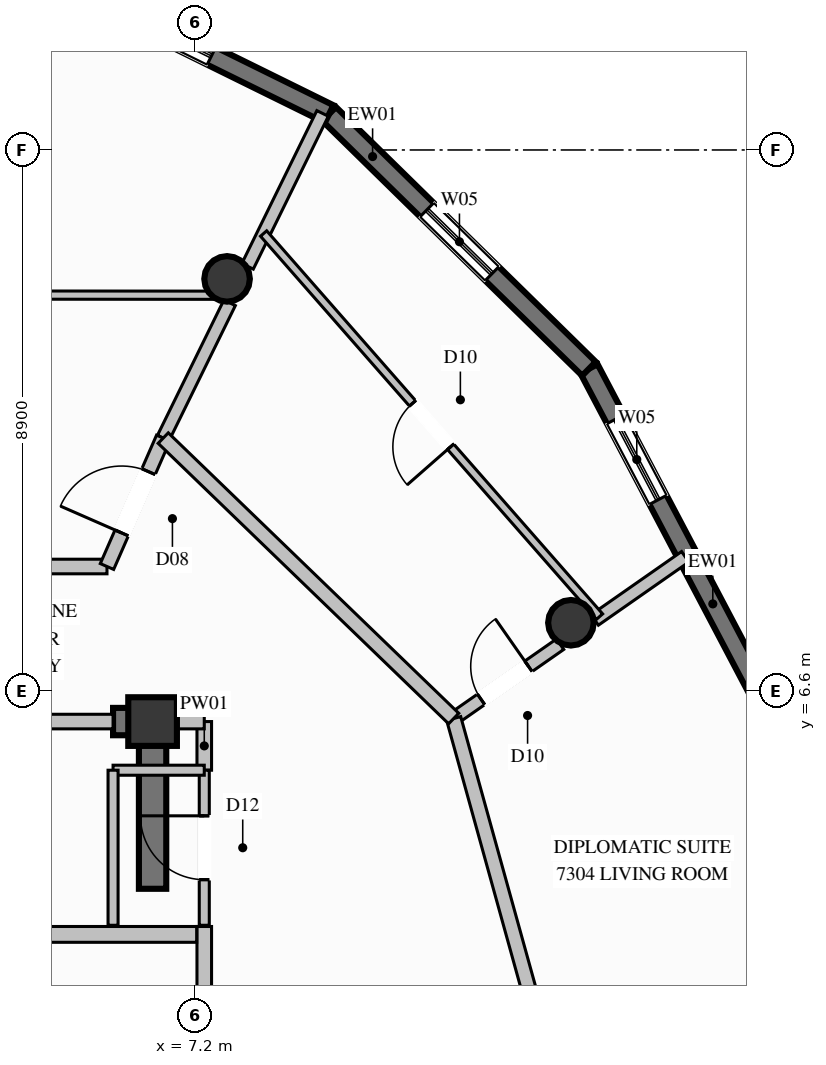
"""IFC4 building model, lengths in metres.
Left out: names, types, materials, properties, quantities, classifications, styles, units other than length and angle.
Written with IfcOpenShell. Run it as: python <this file> out.ifc"""

import sys

from ifc_helpers import new_model, si_unit, direction, frame, frame_2d, origin, origin_2d, place, context, subcontext, project, spatial, rectangle, circle, extrude, element, fill, save


model = new_model("IFC4")
c1 = context("Model", 3, precision=1e-05, world=origin(), true_north=direction((0.0, 1.0)))
c2 = subcontext(c1, "Body", "Model", "MODEL_VIEW")
j1 = project(units=[si_unit("LENGTHUNIT", "METRE"), si_unit("PLANEANGLEUNIT", "RADIAN")], contexts=[c1])
p1 = place(None, origin())
s1 = spatial("IfcSite", under=j1, at=p1, CompositionType="ELEMENT")
p2 = place(p1, origin())
s2 = spatial("IfcBuilding", under=s1, at=p2, CompositionType="ELEMENT")
p3 = place(p2, frame((0.0, 0.0, 274.4)))
s3 = spatial("IfcBuildingStorey", under=s2, at=p3, CompositionType="ELEMENT", Elevation=274.4)
p4 = place(p3, frame((6.5, 6.1, 0.0), z_axis=(0.0, 0.0, 1.0), x_axis=(1.0, 0.0, 0.0)))
e1 = element("IfcColumn", 1, at=p4, inside=s3, PredefinedType="COLUMN", context=c2, shape_type="SweptSolid", body=[
    extrude(rectangle(XDim=0.8, YDim=0.8, at=origin_2d()), origin(), (0.0, 0.0, 1.0), 3.8),
])
p5 = place(p3, frame((5.85, 6.1, 0.0), z_axis=(0.0, 0.0, 1.0), x_axis=(1.0, 0.0, 0.0)))
e2 = element("IfcWall", 2, at=p5, inside=s3, PredefinedType="SHEAR", context=c2, shape_type="SweptSolid", body=[
    extrude(rectangle(XDim=0.425, YDim=0.45, at=frame_2d((0.212, 0.0))), origin(), (0.0, 0.0, 1.0), 3.8),
])
p6 = place(p3, frame((6.5, 3.35, 0.0), z_axis=(0.0, 0.0, 1.0), x_axis=(0.0, 1.0, 0.0)))
e3 = element("IfcWall", 3, at=p6, inside=s3, PredefinedType="SHEAR", context=c2, shape_type="SweptSolid", body=[
    extrude(rectangle(XDim=2.975, YDim=0.45, at=frame_2d((1.487, 0.0))), origin(), (0.0, 0.0, 1.0), 3.8),
])
for number, where, z_axis, x_axis in (
    (4, (13.38, 7.725, 0.0), (0.0, 0.0, 1.0), (1.0, 0.0, 0.0)),
    (5, (7.725, 13.38, 0.0), (0.0, 0.0, 1.0), (1.0, 0.0, 0.0)),
):
    element("IfcColumn", number, at=place(p3, frame(where, z_axis=z_axis, x_axis=x_axis)), inside=s3, PredefinedType="COLUMN", context=c2, shape_type="SweptSolid", body=[
        extrude(circle(Radius=0.375, at=origin_2d()), origin(), (0.0, 0.0, 1.0), 3.8),
    ])
p7 = place(p3, frame((13.677, 11.902, 0.0), z_axis=(0.0, 0.0, 1.0), x_axis=(0.466004047649, -0.884782587744, 0.0)))
e6 = element("IfcWall", 6, at=p7, inside=s3, PredefinedType="SOLIDWALL", context=c2, shape_type="SweptSolid", body=[
    extrude(rectangle(XDim=6.054, YDim=0.32, at=frame_2d((3.027, 0.0))), origin(), (0.0, 0.0, 1.0), 3.57),
])
p8 = place(p7, frame((0.937, 0.0, 0.85)))
e7 = element("IfcOpeningElement", 7, at=p8, cuts=e6, PredefinedType="OPENING", context=c2, shape_type="SweptSolid", body=[
    extrude(rectangle(XDim=1.5, YDim=1.2, at=frame_2d((0.75, 0.6))), frame((0.0, 0.17, 0.0), z_axis=(0.0, -1.0, 0.0), x_axis=(1.0, 0.0, 0.0)), (0.0, 0.0, 1.0), 0.34),
])
p9 = place(p3, frame((9.404, 16.092, 0.0), z_axis=(0.0, 0.0, 1.0), x_axis=(0.714008055463, -0.700137484165, 0.0)))
e8 = element("IfcWall", 8, at=p9, inside=s3, PredefinedType="SOLIDWALL", context=c2, shape_type="SweptSolid", body=[
    extrude(rectangle(XDim=5.984, YDim=0.32, at=frame_2d((2.992, 0.0))), origin(), (0.0, 0.0, 1.0), 3.57),
])
p10 = place(p9, frame((2.251, 0.0, 0.85)))
e9 = element("IfcOpeningElement", 9, at=p10, cuts=e8, PredefinedType="OPENING", context=c2, shape_type="SweptSolid", body=[
    extrude(rectangle(XDim=1.5, YDim=1.2, at=frame_2d((0.75, 0.6))), frame((0.0, 0.17, 0.0), z_axis=(0.0, -1.0, 0.0), x_axis=(1.0, 0.0, 0.0)), (0.0, 0.0, 1.0), 0.34),
])
p11 = place(p3, frame((4.098, 18.707, 0.0), z_axis=(0.0, 0.0, 1.0), x_axis=(0.896987681867, -0.442055537889, 0.0)))
e10 = element("IfcWall", 10, at=p11, inside=s3, PredefinedType="SOLIDWALL", context=c2, shape_type="SweptSolid", body=[
    extrude(rectangle(XDim=5.916, YDim=0.32, at=frame_2d((2.958, 0.0))), origin(), (0.0, 0.0, 1.0), 3.57),
])
p12 = place(p11, frame((1.957, 0.0, 0.35)))
e11 = element("IfcOpeningElement", 11, at=p12, cuts=e10, PredefinedType="OPENING", context=c2, shape_type="SweptSolid", body=[
    extrude(rectangle(XDim=1.8, YDim=2.6, at=frame_2d((0.9, 1.3))), frame((0.0, 0.17, 0.0), z_axis=(0.0, -1.0, 0.0), x_axis=(1.0, 0.0, 0.0)), (0.0, 0.0, 1.0), 0.34),
])
p13 = place(p3, frame((7.35, -2.34, 0.0), z_axis=(0.0, 0.0, 1.0), x_axis=(0.0, 1.0, 0.0)))
e12 = element("IfcWall", 12, at=p13, inside=s3, PredefinedType="PARTITIONING", context=c2, shape_type="SweptSolid", body=[
    extrude(rectangle(XDim=5.07, YDim=0.24, at=frame_2d((2.535, 0.0))), origin(), (0.0, 0.0, 1.0), 2.655),
])
p14 = place(p13, frame((2.548, 0.0, 0.0)))
e13 = element("IfcOpeningElement", 13, at=p14, cuts=e12, PredefinedType="OPENING", context=c2, shape_type="SweptSolid", body=[
    extrude(rectangle(XDim=1.15, YDim=2.2, at=frame_2d((0.575, 1.1))), frame((0.0, 0.13, 0.0), z_axis=(0.0, -1.0, 0.0), x_axis=(1.0, 0.0, 0.0)), (0.0, 0.0, 1.0), 0.26),
])
p15 = place(p3, frame((4.13, 2.6, 0.0), z_axis=(0.0, 0.0, 1.0), x_axis=(1.0, 0.0, 0.0)))
e14 = element("IfcWall", 14, at=p15, inside=s3, PredefinedType="PARTITIONING", context=c2, shape_type="SweptSolid", body=[
    extrude(rectangle(XDim=3.095, YDim=0.26, at=frame_2d((1.548, 0.0))), origin(), (0.0, 0.0, 1.0), 3.57),
])
p16 = place(p3, frame((-7.35, 8.65, 0.0), z_axis=(0.0, 0.0, 1.0), x_axis=(1.0, 0.0, 0.0)))
e15 = element("IfcWall", 15, at=p16, inside=s3, PredefinedType="PARTITIONING", context=c2, shape_type="SweptSolid", body=[
    extrude(rectangle(XDim=13.1, YDim=0.24, at=frame_2d((6.55, 0.0))), origin(), (0.0, 0.0, 1.0), 3.57),
])
p17 = place(p3, frame((3.0, 6.1, 0.0), z_axis=(0.0, 0.0, 1.0), x_axis=(1.0, 0.0, 0.0)))
e16 = element("IfcWall", 16, at=p17, inside=s3, PredefinedType="PARTITIONING", context=c2, shape_type="SweptSolid", body=[
    extrude(rectangle(XDim=2.85, YDim=0.24, at=frame_2d((1.425, 0.0))), origin(), (0.0, 0.0, 1.0), 2.655),
])
p18 = place(p3, frame((7.35, 5.3, 0.0), z_axis=(0.0, 0.0, 1.0), x_axis=(0.0, 1.0, 0.0)))
e17 = element("IfcWall", 17, at=p18, inside=s3, PredefinedType="PARTITIONING", context=c2, shape_type="SweptSolid", body=[
    extrude(rectangle(XDim=0.8, YDim=0.24, at=frame_2d((0.4, 0.0))), origin(), (0.0, 0.0, 1.0), 2.655),
])
p19 = place(p3, frame((6.5, 6.1, 0.0), z_axis=(0.0, 0.0, 1.0), x_axis=(1.0, 0.0, 0.0)))
e18 = element("IfcWall", 18, at=p19, inside=s3, PredefinedType="PARTITIONING", context=c2, shape_type="SweptSolid", body=[
    extrude(rectangle(XDim=0.85, YDim=0.24, at=frame_2d((0.425, 0.0))), origin(), (0.0, 0.0, 1.0), 3.086),
])
p20 = place(p3, frame((7.35, 2.75, 0.0), z_axis=(0.0, 0.0, 1.0), x_axis=(0.0, 1.0, 0.0)))
e19 = element("IfcWall", 19, at=p20, inside=s3, PredefinedType="PARTITIONING", context=c2, shape_type="SweptSolid", body=[
    extrude(rectangle(XDim=2.55, YDim=0.165, at=frame_2d((1.275, 0.0))), origin(), (0.0, 0.0, 1.0), 3.57),
])
p21 = place(p20, frame((0.75, 0.0, 0.0)))
e20 = element("IfcOpeningElement", 20, at=p21, cuts=e19, PredefinedType="OPENING", context=c2, shape_type="SweptSolid", body=[
    extrude(rectangle(XDim=1.05, YDim=2.15, at=frame_2d((0.525, 1.075))), frame((0.0, 0.093, 0.0), z_axis=(0.0, -1.0, 0.0), x_axis=(1.0, 0.0, 0.0)), (0.0, 0.0, 1.0), 0.185),
])
p22 = place(p3, frame((7.35, 5.3, 0.0), z_axis=(0.0, 0.0, 1.0), x_axis=(-1.0, 0.0, 0.0)))
e21 = element("IfcWall", 21, at=p22, inside=s3, PredefinedType="PARTITIONING", context=c2, shape_type="SweptSolid", body=[
    extrude(rectangle(XDim=1.5, YDim=0.165, at=frame_2d((0.75, 0.0))), origin(), (0.0, 0.0, 1.0), 2.655),
])
p23 = place(p3, frame((5.85, 5.3, 0.0), z_axis=(0.0, 0.0, 1.0), x_axis=(0.0, -1.0, 0.0)))
e22 = element("IfcWall", 22, at=p23, inside=s3, PredefinedType="PARTITIONING", context=c2, shape_type="SweptSolid", body=[
    extrude(rectangle(XDim=2.55, YDim=0.165, at=frame_2d((1.275, 0.0))), origin(), (0.0, 0.0, 1.0), 2.655),
])
p24 = place(p3, frame((11.452, 6.15, 0.0), z_axis=(0.0, 0.0, 1.0), x_axis=(0.819854753172, 0.572571553346, 0.0)))
e23 = element("IfcWall", 23, at=p24, inside=s3, PredefinedType="PARTITIONING", context=c2, shape_type="SweptSolid", body=[
    extrude(rectangle(XDim=2.135, YDim=0.21, at=frame_2d((1.067, 0.0))), origin(), (0.0, 0.0, 1.0), 3.086),
])
p25 = place(p24, frame((0.55, 0.0, 0.0)))
e24 = element("IfcOpeningElement", 24, at=p25, cuts=e23, PredefinedType="OPENING", context=c2, shape_type="SweptSolid", body=[
    extrude(rectangle(XDim=0.95, YDim=2.1, at=frame_2d((0.475, 1.05))), frame((0.0, 0.115, 0.0), z_axis=(0.0, -1.0, 0.0), x_axis=(1.0, 0.0, 0.0)), (0.0, 0.0, 1.0), 0.23),
])
p26 = place(p3, frame((13.772, 7.771, 0.0), z_axis=(0.0, 0.0, 1.0), x_axis=(0.81989494027, 0.572514005872, 0.0)))
e25 = element("IfcWall", 25, at=p26, inside=s3, PredefinedType="PARTITIONING", context=c2, shape_type="SweptSolid", body=[
    extrude(rectangle(XDim=1.815, YDim=0.21, at=frame_2d((0.907, 0.0))), origin(), (0.0, 0.0, 1.0), 3.57),
])
p27 = place(p3, frame((6.675, 10.762, 0.0), z_axis=(0.0, 0.0, 1.0), x_axis=(0.440582273055, 0.897712237117, 0.0)))
e26 = element("IfcWall", 26, at=p27, inside=s3, PredefinedType="PARTITIONING", context=c2, shape_type="SweptSolid", body=[
    extrude(rectangle(XDim=2.479, YDim=0.21, at=frame_2d((1.239, 0.0))), origin(), (0.0, 0.0, 1.0), 3.086),
])
p28 = place(p3, frame((8.062, 13.587, 0.0), z_axis=(0.0, 0.0, 1.0), x_axis=(0.440576121929, 0.897715255961, 0.0)))
e27 = element("IfcWall", 27, at=p28, inside=s3, PredefinedType="PARTITIONING", context=c2, shape_type="SweptSolid", body=[
    extrude(rectangle(XDim=2.801, YDim=0.21, at=frame_2d((1.4, 0.0))), origin(), (0.0, 0.0, 1.0), 3.57),
])
p29 = place(p3, frame((5.75, 8.65, 0.0), z_axis=(0.0, 0.0, 1.0), x_axis=(0.401190953907, 0.915994442398, 0.0)))
e28 = element("IfcWall", 28, at=p29, inside=s3, PredefinedType="PARTITIONING", context=c2, shape_type="SweptSolid", body=[
    extrude(rectangle(XDim=2.306, YDim=0.24, at=frame_2d((1.153, 0.0))), origin(), (0.0, 0.0, 1.0), 3.086),
])
p30 = place(p29, frame((0.603, 0.0, 0.0)))
e29 = element("IfcOpeningElement", 29, at=p30, cuts=e28, PredefinedType="OPENING", context=c2, shape_type="SweptSolid", body=[
    extrude(rectangle(XDim=1.1, YDim=2.3, at=frame_2d((0.55, 1.15))), frame((0.0, 0.13, 0.0), z_axis=(0.0, -1.0, 0.0), x_axis=(1.0, 0.0, 0.0)), (0.0, 0.0, 1.0), 0.26),
])
p31 = place(p3, frame((-2.217, 13.118, 0.0), z_axis=(0.0, 0.0, 1.0), x_axis=(0.999999768435, -0.000680536494, 0.0)))
e30 = element("IfcWall", 30, at=p31, inside=s3, PredefinedType="PARTITIONING", context=c2, shape_type="SweptSolid", body=[
    extrude(rectangle(XDim=10.045, YDim=0.135, at=frame_2d((5.022, 0.0))), origin(), (0.0, 0.0, 1.0), 3.138),
])
p32 = place(p31, frame((4.548, 0.0, 0.0)))
e31 = element("IfcOpeningElement", 31, at=p32, cuts=e30, PredefinedType="OPENING", context=c2, shape_type="SweptSolid", body=[
    extrude(rectangle(XDim=0.95, YDim=2.1, at=frame_2d((0.475, 1.05))), frame((0.0, 0.078, 0.0), z_axis=(0.0, -1.0, 0.0), x_axis=(1.0, 0.0, 0.0)), (0.0, 0.0, 1.0), 0.155),
])
p33 = place(p3, frame((13.2, -0.15, 0.0), z_axis=(0.0, 0.0, 1.0), x_axis=(-0.267374214985, 0.963592771435, 0.0)))
e32 = element("IfcWall", 32, at=p33, inside=s3, PredefinedType="PARTITIONING", context=c2, shape_type="SweptSolid", body=[
    extrude(rectangle(XDim=6.538, YDim=0.24, at=frame_2d((3.269, 0.0))), origin(), (0.0, 0.0, 1.0), 3.57),
])
p34 = place(p3, frame((11.452, 6.15, 0.0), z_axis=(0.0, 0.0, 1.0), x_axis=(-0.719407162497, 0.694588608133, 0.0)))
e33 = element("IfcWall", 33, at=p34, inside=s3, PredefinedType="PARTITIONING", context=c2, shape_type="SweptSolid", body=[
    extrude(rectangle(XDim=6.64, YDim=0.24, at=frame_2d((3.32, 0.0))), origin(), (0.0, 0.0, 1.0), 3.57),
])
p35 = place(p3, frame((13.851, 7.826, 0.0), z_axis=(0.0, 0.0, 1.0), x_axis=(-0.659356064883, 0.751830818537, 0.0)))
e34 = element("IfcWall", 34, at=p35, inside=s3, PredefinedType="PARTITIONING", context=c2, shape_type="SweptSolid", body=[
    extrude(rectangle(XDim=8.38, YDim=0.135, at=frame_2d((4.19, 0.0))), origin(), (0.0, 0.0, 1.0), 3.005),
])
p36 = place(p35, frame((3.715, 0.0, 0.0)))
e35 = element("IfcOpeningElement", 35, at=p36, cuts=e34, PredefinedType="OPENING", context=c2, shape_type="SweptSolid", body=[
    extrude(rectangle(XDim=0.95, YDim=2.1, at=frame_2d((0.475, 1.05))), frame((0.0, 0.078, 0.0), z_axis=(0.0, -1.0, 0.0), x_axis=(1.0, 0.0, 0.0)), (0.0, 0.0, 1.0), 0.155),
])
p37 = place(p8, origin())
e36 = element("IfcWindow", 36, at=p37, inside=s3, PartitioningType="SINGLE_PANEL", PredefinedType="WINDOW", context=c2, shape_type="SweptSolid", body=[
    extrude(rectangle(XDim=1.5, YDim=1.2, at=frame_2d((0.75, 0.6))), frame((0.0, 0.03, 0.0), z_axis=(0.0, -1.0, 0.0), x_axis=(1.0, 0.0, 0.0)), (0.0, 0.0, 1.0), 0.06),
])
fill(e7, e36)
p38 = place(p10, origin())
e37 = element("IfcWindow", 37, at=p38, inside=s3, PartitioningType="SINGLE_PANEL", PredefinedType="WINDOW", context=c2, shape_type="SweptSolid", body=[
    extrude(rectangle(XDim=1.5, YDim=1.2, at=frame_2d((0.75, 0.6))), frame((0.0, 0.03, 0.0), z_axis=(0.0, -1.0, 0.0), x_axis=(1.0, 0.0, 0.0)), (0.0, 0.0, 1.0), 0.06),
])
fill(e9, e37)
p39 = place(p12, origin())
e38 = element("IfcWindow", 38, at=p39, inside=s3, PartitioningType="SINGLE_PANEL", PredefinedType="WINDOW", context=c2, shape_type="SweptSolid", body=[
    extrude(rectangle(XDim=1.8, YDim=2.6, at=frame_2d((0.9, 1.3))), frame((0.0, 0.03, 0.0), z_axis=(0.0, -1.0, 0.0), x_axis=(1.0, 0.0, 0.0)), (0.0, 0.0, 1.0), 0.06),
])
fill(e11, e38)
p40 = place(p21, origin())
e39 = element("IfcDoor", 39, at=p40, inside=s3, OperationType="SINGLE_SWING_RIGHT", PredefinedType="DOOR", context=c2, shape_type="SweptSolid", body=[
    extrude(rectangle(XDim=1.05, YDim=2.15, at=frame_2d((0.525, 1.075))), frame((0.0, 0.025, 0.0), z_axis=(0.0, -1.0, 0.0), x_axis=(1.0, 0.0, 0.0)), (0.0, 0.0, 1.0), 0.05),
])
fill(e20, e39)
p41 = place(p30, origin())
e40 = element("IfcDoor", 40, at=p41, inside=s3, OperationType="SINGLE_SWING_LEFT", PredefinedType="DOOR", context=c2, shape_type="SweptSolid", body=[
    extrude(rectangle(XDim=1.1, YDim=2.3, at=frame_2d((0.55, 1.15))), frame((0.0, 0.025, 0.0), z_axis=(0.0, -1.0, 0.0), x_axis=(1.0, 0.0, 0.0)), (0.0, 0.0, 1.0), 0.05),
])
fill(e29, e40)
p42 = place(p25, origin())
e41 = element("IfcDoor", 41, at=p42, inside=s3, OperationType="SINGLE_SWING_RIGHT", PredefinedType="DOOR", context=c2, shape_type="SweptSolid", body=[
    extrude(rectangle(XDim=0.95, YDim=2.1, at=frame_2d((0.475, 1.05))), frame((0.0, 0.025, 0.0), z_axis=(0.0, -1.0, 0.0), x_axis=(1.0, 0.0, 0.0)), (0.0, 0.0, 1.0), 0.05),
])
fill(e24, e41)
p43 = place(p36, origin())
e42 = element("IfcDoor", 42, at=p43, inside=s3, OperationType="SINGLE_SWING_LEFT", PredefinedType="DOOR", context=c2, shape_type="SweptSolid", body=[
    extrude(rectangle(XDim=0.95, YDim=2.1, at=frame_2d((0.475, 1.05))), frame((0.0, 0.025, 0.0), z_axis=(0.0, -1.0, 0.0), x_axis=(1.0, 0.0, 0.0)), (0.0, 0.0, 1.0), 0.05),
])
fill(e35, e42)
save(model, sys.argv[1])
